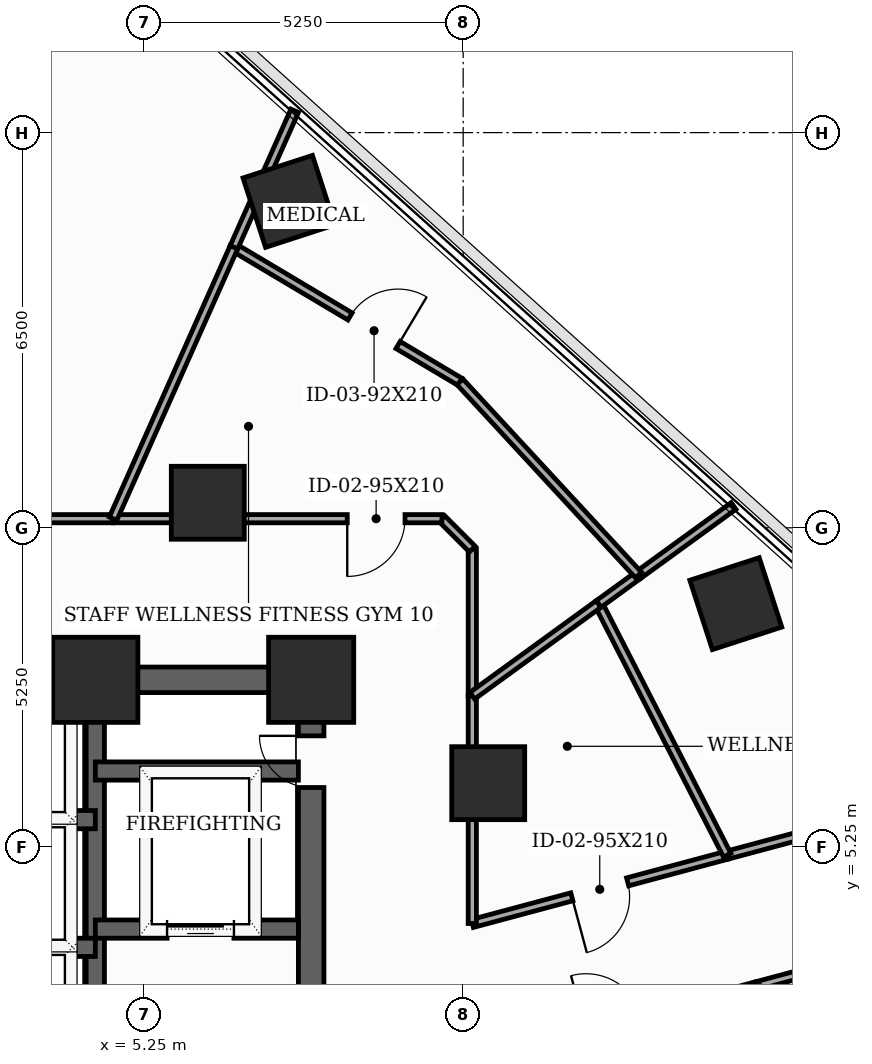
"""IFC4 building model, lengths in metres.
Left out: names, types, materials, properties, quantities, classifications, styles, units other than length and angle.
Written with IfcOpenShell. Run it as: python <this file> out.ifc"""

import sys

from ifc_helpers import new_model, si_unit, direction, frame, frame_2d, origin, origin_2d, place, context, subcontext, project, spatial, rectangle, extrude, element, fill, save


model = new_model("IFC4")
c1 = context("Model", 3, precision=1e-05, world=origin(), true_north=direction((0.0, 1.0)))
c2 = subcontext(c1, "Body", "Model", "MODEL_VIEW")
j1 = project(units=[si_unit("LENGTHUNIT", "METRE"), si_unit("PLANEANGLEUNIT", "RADIAN")], contexts=[c1])
p1 = place(None, origin())
s1 = spatial("IfcSite", under=j1, at=p1, CompositionType="ELEMENT")
p2 = place(p1, origin())
s2 = spatial("IfcBuilding", under=s1, at=p2, CompositionType="ELEMENT")
p3 = place(p2, frame((0.0, 0.0, 108.8)))
s3 = spatial("IfcBuildingStorey", under=s2, at=p3, CompositionType="ELEMENT", Elevation=108.8)
for number, where, z_axis, x_axis in (
    (1, (8.0, 8.0, 0.0), (0.0, 0.0, 1.0), (1.0, 0.0, 0.0)),
    (2, (4.45, 8.0, 0.0), (0.0, 0.0, 1.0), (1.0, 0.0, 0.0)),
):
    element("IfcColumn", number, at=place(p3, frame(where, z_axis=z_axis, x_axis=x_axis)), inside=s3, PredefinedType="COLUMN", context=c2, shape_type="SweptSolid", body=[
        extrude(rectangle(XDim=1.4, YDim=1.4, at=origin_2d()), origin(), (0.0, 0.0, 1.0), 3.7),
    ])
for number, where, z_axis, x_axis in (
    (3, (10.912, 6.3, 0.0), (0.0, 0.0, 1.0), (1.0, 0.0, 0.0)),
    (4, (6.3, 10.912, 0.0), (0.0, 0.0, 1.0), (1.0, 0.0, 0.0)),
    (5, (14.984, 9.252, 0.0), (0.0, 0.0, 1.0), (0.951, 0.309, 0.0)),
    (6, (7.635, 15.869, 0.0), (0.0, 0.0, 1.0), (0.951, 0.309, 0.0)),
):
    element("IfcColumn", number, at=place(p3, frame(where, z_axis=z_axis, x_axis=x_axis)), inside=s3, PredefinedType="COLUMN", context=c2, shape_type="SweptSolid", body=[
        extrude(rectangle(XDim=1.2, YDim=1.2, at=origin_2d()), origin(), (0.0, 0.0, 1.0), 3.7),
    ])
p4 = place(p3, frame((8.0, -8.0, 0.0), z_axis=(0.0, 0.0, 1.0), x_axis=(0.0, 1.0, 0.0)))
e7 = element("IfcWall", 7, at=p4, inside=s3, PredefinedType="SHEAR", context=c2, shape_type="SweptSolid", body=[
    extrude(rectangle(XDim=16.0, YDim=0.42, at=frame_2d((8.0, 0.0))), origin(), (0.0, 0.0, 1.0), 3.5),
])
p5 = place(p4, frame((9.6, 0.0, 0.0)))
e8 = element("IfcOpeningElement", 8, at=p5, cuts=e7, PredefinedType="OPENING", context=c2, shape_type="SweptSolid", body=[
    extrude(rectangle(XDim=1.05, YDim=2.15, at=frame_2d((0.525, 1.075))), frame((0.0, 0.22, 0.0), z_axis=(0.0, -1.0, 0.0), x_axis=(1.0, 0.0, 0.0)), (0.0, 0.0, 1.0), 0.44),
])
p6 = place(p4, frame((14.229, 0.0, 0.0)))
e9 = element("IfcOpeningElement", 9, at=p6, cuts=e7, PredefinedType="OPENING", context=c2, shape_type="SweptSolid", body=[
    extrude(rectangle(XDim=0.85, YDim=2.02, at=frame_2d((0.425, 1.01))), frame((0.0, 0.22, 0.0), z_axis=(0.0, -1.0, 0.0), x_axis=(1.0, 0.0, 0.0)), (0.0, 0.0, 1.0), 0.44),
])
p7 = place(p3, frame((-8.0, 8.0, 0.0), z_axis=(0.0, 0.0, 1.0), x_axis=(1.0, 0.0, 0.0)))
e10 = element("IfcWall", 10, at=p7, inside=s3, PredefinedType="SHEAR", context=c2, shape_type="SweptSolid", body=[
    extrude(rectangle(XDim=16.0, YDim=0.42, at=frame_2d((8.0, 0.0))), origin(), (0.0, 0.0, 1.0), 3.5),
])
p8 = place(p7, frame((7.1, 0.0, 0.0)))
e11 = element("IfcOpeningElement", 11, at=p8, cuts=e10, PredefinedType="OPENING", context=c2, shape_type="SweptSolid", body=[
    extrude(rectangle(XDim=1.8, YDim=2.15, at=frame_2d((0.9, 1.075))), frame((0.0, 0.22, 0.0), z_axis=(0.0, -1.0, 0.0), x_axis=(1.0, 0.0, 0.0)), (0.0, 0.0, 1.0), 0.44),
])
p9 = place(p3, frame((4.45, -7.79, 0.0), z_axis=(0.0, 0.0, 1.0), x_axis=(0.0, 1.0, 0.0)))
e12 = element("IfcWall", 12, at=p9, inside=s3, PredefinedType="SHEAR", context=c2, shape_type="SweptSolid", body=[
    extrude(rectangle(XDim=15.58, YDim=0.3, at=frame_2d((7.79, 0.0))), origin(), (0.0, 0.0, 1.0), 3.5),
])
p10 = place(p3, frame((4.45, 3.9, 0.0), z_axis=(0.0, 0.0, 1.0), x_axis=(1.0, 0.0, 0.0)))
e13 = element("IfcWall", 13, at=p10, inside=s3, PredefinedType="SHEAR", context=c2, shape_type="SweptSolid", body=[
    extrude(rectangle(XDim=3.34, YDim=0.3, at=frame_2d((1.67, 0.0))), origin(), (0.0, 0.0, 1.0), 3.5),
])
p11 = place(p10, frame((1.18, 0.0, 0.0)))
e14 = element("IfcOpeningElement", 14, at=p11, cuts=e13, PredefinedType="OPENING", context=c2, shape_type="SweptSolid", body=[
    extrude(rectangle(XDim=1.1, YDim=2.1, at=frame_2d((0.55, 1.05))), frame((0.0, 0.16, 0.0), z_axis=(0.0, -1.0, 0.0), x_axis=(1.0, 0.0, 0.0)), (0.0, 0.0, 1.0), 0.32),
])
p12 = place(p3, frame((4.45, 6.5, 0.0), z_axis=(0.0, 0.0, 1.0), x_axis=(1.0, 0.0, 0.0)))
e15 = element("IfcWall", 15, at=p12, inside=s3, PredefinedType="SHEAR", context=c2, shape_type="SweptSolid", body=[
    extrude(rectangle(XDim=3.34, YDim=0.3, at=frame_2d((1.67, 0.0))), origin(), (0.0, 0.0, 1.0), 3.5),
])
for number, where, z_axis, x_axis in (
    (16, (1.68, 3.6, 0.0), (0.0, 0.0, 1.0), (1.0, 0.0, 0.0)),
    (17, (1.68, 5.7, 0.0), (0.0, 0.0, 1.0), (1.0, 0.0, 0.0)),
):
    element("IfcWall", number, at=place(p3, frame(where, z_axis=z_axis, x_axis=x_axis)), inside=s3, PredefinedType="SHEAR", context=c2, shape_type="SweptSolid", body=[
        extrude(rectangle(XDim=2.77, YDim=0.3, at=frame_2d((1.385, 0.0))), origin(), (0.0, 0.0, 1.0), 3.5),
    ])
p13 = place(p3, frame((15.307, 2.963, 0.0), z_axis=(0.0, 0.0, 1.0), x_axis=(0.965966165677, 0.258668449501, 0.0)))
e18 = element("IfcWall", 18, at=p13, inside=s3, PredefinedType="PARTITIONING", context=c2, shape_type="SweptSolid", body=[
    extrude(rectangle(XDim=3.248, YDim=0.135, at=frame_2d((1.624, 0.0))), origin(), (0.0, 0.0, 1.0), 3.125),
])
p14 = place(p3, frame((17.875, 5.928, 0.0), z_axis=(0.0, 0.0, 1.0), x_axis=(-0.96597893007, -0.258620777704, 0.0)))
e19 = element("IfcWall", 19, at=p14, inside=s3, PredefinedType="PARTITIONING", context=c2, shape_type="SweptSolid", body=[
    extrude(rectangle(XDim=3.14, YDim=0.135, at=frame_2d((1.57, 0.0))), origin(), (0.0, 0.0, 1.0), 3.125),
])
p15 = place(p3, frame((10.65, 1.715, 0.0), z_axis=(0.0, 0.0, 1.0), x_axis=(0.965927482723, 0.258812863129, 0.0)))
e20 = element("IfcWall", 20, at=p15, inside=s3, PredefinedType="PARTITIONING", context=c2, shape_type="SweptSolid", body=[
    extrude(rectangle(XDim=4.821, YDim=0.135, at=frame_2d((2.411, 0.0))), origin(), (0.0, 0.0, 1.0), 2.785),
])
p16 = place(p15, frame((1.936, 0.0, 0.0)))
e21 = element("IfcOpeningElement", 21, at=p16, cuts=e20, PredefinedType="OPENING", context=c2, shape_type="SweptSolid", body=[
    extrude(rectangle(XDim=0.95, YDim=2.1, at=frame_2d((0.475, 1.05))), frame((0.0, 0.077, 0.0), z_axis=(0.0, -1.0, 0.0), x_axis=(1.0, 0.0, 0.0)), (0.0, 0.0, 1.0), 0.155),
])
p17 = place(p3, frame((14.842, 5.116, 0.0), z_axis=(0.0, 0.0, 1.0), x_axis=(-0.965883000332, -0.258978820891, 0.0)))
e22 = element("IfcWall", 22, at=p17, inside=s3, PredefinedType="PARTITIONING", context=c2, shape_type="SweptSolid", body=[
    extrude(rectangle(XDim=4.34, YDim=0.135, at=frame_2d((2.17, 0.0))), origin(), (0.0, 0.0, 1.0), 2.785),
])
p18 = place(p17, frame((1.695, 0.0, 0.0)))
e23 = element("IfcOpeningElement", 23, at=p18, cuts=e22, PredefinedType="OPENING", context=c2, shape_type="SweptSolid", body=[
    extrude(rectangle(XDim=0.95, YDim=2.1, at=frame_2d((0.475, 1.05))), frame((0.0, 0.077, 0.0), z_axis=(0.0, -1.0, 0.0), x_axis=(1.0, 0.0, 0.0)), (0.0, 0.0, 1.0), 0.155),
])
p19 = place(p3, frame((10.65, 3.992, 0.0), z_axis=(0.0, 0.0, 1.0), x_axis=(0.0, 1.0, 0.0)))
e24 = element("IfcWall", 24, at=p19, inside=s3, PredefinedType="PARTITIONING", context=c2, shape_type="SweptSolid", body=[
    extrude(rectangle(XDim=3.746, YDim=0.135, at=frame_2d((1.873, 0.0))), origin(), (0.0, 0.0, 1.0), 2.785),
])
p20 = place(p3, frame((10.65, 7.738, 0.0), z_axis=(0.0, 0.0, 1.0), x_axis=(0.0, 1.0, 0.0)))
e25 = element("IfcWall", 25, at=p20, inside=s3, PredefinedType="PARTITIONING", context=c2, shape_type="SweptSolid", body=[
    extrude(rectangle(XDim=2.412, YDim=0.135, at=frame_2d((1.206, 0.0))), origin(), (0.0, 0.0, 1.0), 3.125),
])
p21 = place(p3, frame((10.65, 10.15, 0.0), z_axis=(0.0, 0.0, 1.0), x_axis=(-0.707106781187, 0.707106781187, 0.0)))
e26 = element("IfcWall", 26, at=p21, inside=s3, PredefinedType="PARTITIONING", context=c2, shape_type="SweptSolid", body=[
    extrude(rectangle(XDim=0.707, YDim=0.135, at=frame_2d((0.354, 0.0))), origin(), (0.0, 0.0, 1.0), 3.125),
])
p22 = place(p3, frame((10.15, 10.65, 0.0), z_axis=(0.0, 0.0, 1.0), x_axis=(-1.0, 0.0, 0.0)))
e27 = element("IfcWall", 27, at=p22, inside=s3, PredefinedType="PARTITIONING", context=c2, shape_type="SweptSolid", body=[
    extrude(rectangle(XDim=5.408, YDim=0.135, at=frame_2d((2.704, 0.0))), origin(), (0.0, 0.0, 1.0), 2.785),
])
p23 = place(p22, frame((0.607, 0.0, 0.0)))
e28 = element("IfcOpeningElement", 28, at=p23, cuts=e27, PredefinedType="OPENING", context=c2, shape_type="SweptSolid", body=[
    extrude(rectangle(XDim=0.95, YDim=2.1, at=frame_2d((0.475, 1.05))), frame((0.0, 0.077, 0.0), z_axis=(0.0, -1.0, 0.0), x_axis=(1.0, 0.0, 0.0)), (0.0, 0.0, 1.0), 0.155),
])
p24 = place(p3, frame((4.742, 10.65, 0.0), z_axis=(0.0, 0.0, 1.0), x_axis=(-1.0, 0.0, 0.0)))
e29 = element("IfcWall", 29, at=p24, inside=s3, PredefinedType="PARTITIONING", context=c2, shape_type="SweptSolid", body=[
    extrude(rectangle(XDim=10.405, YDim=0.135, at=frame_2d((5.203, 0.0))), origin(), (0.0, 0.0, 1.0), 2.785),
])
p25 = place(p24, frame((5.976, 0.0, 0.0)))
e30 = element("IfcOpeningElement", 30, at=p25, cuts=e29, PredefinedType="OPENING", context=c2, shape_type="SweptSolid", body=[
    extrude(rectangle(XDim=0.95, YDim=2.1, at=frame_2d((0.475, 1.05))), frame((0.0, 0.077, 0.0), z_axis=(0.0, -1.0, 0.0), x_axis=(1.0, 0.0, 0.0)), (0.0, 0.0, 1.0), 0.155),
])
p26 = place(p3, frame((12.726, 9.246, 0.0), z_axis=(0.0, 0.0, 1.0), x_axis=(0.455967351564, -0.889996502413, 0.0)))
e31 = element("IfcWall", 31, at=p26, inside=s3, PredefinedType="PARTITIONING", context=c2, shape_type="SweptSolid", body=[
    extrude(rectangle(XDim=4.641, YDim=0.135, at=frame_2d((2.32, 0.0))), origin(), (0.0, 0.0, 1.0), 2.785),
])
p27 = place(p3, frame((14.947, 10.86, 0.0), z_axis=(0.0, 0.0, 1.0), x_axis=(-0.809090948161, -0.58768345017, 0.0)))
e32 = element("IfcWall", 32, at=p27, inside=s3, PredefinedType="PARTITIONING", context=c2, shape_type="SweptSolid", body=[
    extrude(rectangle(XDim=1.933, YDim=0.135, at=frame_2d((0.967, 0.0))), origin(), (0.0, 0.0, 1.0), 2.935),
])
p28 = place(p3, frame((13.383, 9.724, 0.0), z_axis=(0.0, 0.0, 1.0), x_axis=(-0.808606124949, -0.588350350297, 0.0)))
e33 = element("IfcWall", 33, at=p28, inside=s3, PredefinedType="PARTITIONING", context=c2, shape_type="SweptSolid", body=[
    extrude(rectangle(XDim=0.812, YDim=0.135, at=frame_2d((0.406, 0.0))), origin(), (0.0, 0.0, 1.0), 3.5),
])
p29 = place(p3, frame((12.726, 9.246, 0.0), z_axis=(0.0, 0.0, 1.0), x_axis=(-0.80908565166, -0.587690742039, 0.0)))
e34 = element("IfcWall", 34, at=p29, inside=s3, PredefinedType="PARTITIONING", context=c2, shape_type="SweptSolid", body=[
    extrude(rectangle(XDim=2.566, YDim=0.135, at=frame_2d((1.283, 0.0))), origin(), (0.0, 0.0, 1.0), 3.125),
])
p30 = place(p3, frame((6.729, 15.113, 0.0), z_axis=(0.0, 0.0, 1.0), x_axis=(0.859389125663, -0.511322139841, 0.0)))
e35 = element("IfcWall", 35, at=p30, inside=s3, PredefinedType="PARTITIONING", context=c2, shape_type="SweptSolid", body=[
    extrude(rectangle(XDim=4.326, YDim=0.135, at=frame_2d((2.163, 0.0))), origin(), (0.0, 0.0, 1.0), 2.785),
])
p31 = place(p30, frame((2.222, 0.0, 0.0)))
e36 = element("IfcOpeningElement", 36, at=p31, cuts=e35, PredefinedType="OPENING", context=c2, shape_type="SweptSolid", body=[
    extrude(rectangle(XDim=0.92, YDim=2.1, at=frame_2d((0.46, 1.05))), frame((0.0, 0.077, 0.0), z_axis=(0.0, -1.0, 0.0), x_axis=(1.0, 0.0, 0.0)), (0.0, 0.0, 1.0), 0.155),
])
p32 = place(p3, frame((10.447, 12.901, 0.0), z_axis=(0.0, 0.0, 1.0), x_axis=(0.678734730072, -0.734383527997, 0.0)))
e37 = element("IfcWall", 37, at=p32, inside=s3, PredefinedType="PARTITIONING", context=c2, shape_type="SweptSolid", body=[
    extrude(rectangle(XDim=4.326, YDim=0.135, at=frame_2d((2.163, 0.0))), origin(), (0.0, 0.0, 1.0), 3.5),
])
p33 = place(p3, frame((7.729, 17.359, 0.0), z_axis=(0.0, 0.0, 1.0), x_axis=(-0.406728032322, -0.913549291349, 0.0)))
e38 = element("IfcWall", 38, at=p33, inside=s3, PredefinedType="PARTITIONING", context=c2, shape_type="SweptSolid", body=[
    extrude(rectangle(XDim=2.459, YDim=0.135, at=frame_2d((1.229, 0.0))), origin(), (0.0, 0.0, 1.0), 2.935),
])
p34 = place(p3, frame((6.729, 15.113, 0.0), z_axis=(0.0, 0.0, 1.0), x_axis=(-0.406727234472, -0.913549646565, 0.0)))
e39 = element("IfcWall", 39, at=p34, inside=s3, PredefinedType="PARTITIONING", context=c2, shape_type="SweptSolid", body=[
    extrude(rectangle(XDim=4.885, YDim=0.135, at=frame_2d((2.443, 0.0))), origin(), (0.0, 0.0, 1.0), 2.785),
])
p35 = place(p6, origin())
e40 = element("IfcDoor", 40, at=p35, inside=s3, OperationType="SINGLE_SWING_RIGHT", PredefinedType="TRAPDOOR", context=c2, shape_type="SweptSolid", body=[
    extrude(rectangle(XDim=0.85, YDim=2.02, at=frame_2d((0.425, 1.01))), frame((0.0, 0.025, 0.0), z_axis=(0.0, -1.0, 0.0), x_axis=(1.0, 0.0, 0.0)), (0.0, 0.0, 1.0), 0.05),
])
fill(e9, e40)
p36 = place(p11, origin())
e41 = element("IfcDoor", 41, at=p36, inside=s3, OperationType="SLIDING_TO_LEFT", PredefinedType="DOOR", context=c2, shape_type="SweptSolid", body=[
    extrude(rectangle(XDim=1.1, YDim=2.1, at=frame_2d((0.55, 1.05))), frame((0.0, 0.025, 0.0), z_axis=(0.0, -1.0, 0.0), x_axis=(1.0, 0.0, 0.0)), (0.0, 0.0, 1.0), 0.05),
])
fill(e14, e41)
p37 = place(p18, origin())
e42 = element("IfcDoor", 42, at=p37, inside=s3, OperationType="SINGLE_SWING_RIGHT", PredefinedType="DOOR", context=c2, shape_type="SweptSolid", body=[
    extrude(rectangle(XDim=0.95, YDim=2.1, at=frame_2d((0.475, 1.05))), frame((0.0, 0.025, 0.0), z_axis=(0.0, -1.0, 0.0), x_axis=(1.0, 0.0, 0.0)), (0.0, 0.0, 1.0), 0.05),
])
fill(e23, e42)
p38 = place(p23, origin())
e43 = element("IfcDoor", 43, at=p38, inside=s3, OperationType="SINGLE_SWING_RIGHT", PredefinedType="DOOR", context=c2, shape_type="SweptSolid", body=[
    extrude(rectangle(XDim=0.95, YDim=2.1, at=frame_2d((0.475, 1.05))), frame((0.0, 0.025, 0.0), z_axis=(0.0, -1.0, 0.0), x_axis=(1.0, 0.0, 0.0)), (0.0, 0.0, 1.0), 0.05),
])
fill(e28, e43)
p39 = place(p31, origin())
e44 = element("IfcDoor", 44, at=p39, inside=s3, OperationType="SINGLE_SWING_RIGHT", PredefinedType="DOOR", context=c2, shape_type="SweptSolid", body=[
    extrude(rectangle(XDim=0.92, YDim=2.1, at=frame_2d((0.46, 1.05))), frame((0.0, 0.025, 0.0), z_axis=(0.0, -1.0, 0.0), x_axis=(1.0, 0.0, 0.0)), (0.0, 0.0, 1.0), 0.05),
])
fill(e36, e44)
save(model, sys.argv[1])
